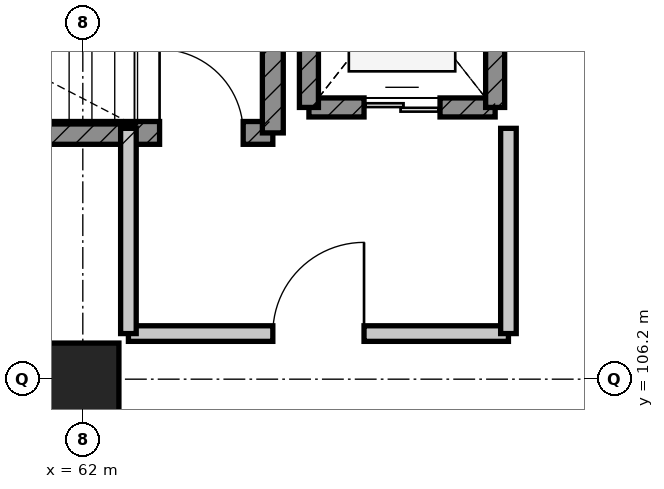
"""IFC4 building model, lengths in metres.
Left out: names, types, materials, properties, quantities, classifications, styles, units other than length and angle.
Written with IfcOpenShell. Run it as: python <this file> out.ifc"""

import sys

from ifc_helpers import new_model, si_unit, direction, frame, frame_2d, origin, origin_2d, place, context, subcontext, project, spatial, rectangle, extrude, element, fill, save


model = new_model("IFC4")
c1 = context("Model", 3, precision=1e-05, world=origin(), true_north=direction((0.0, 1.0)))
c2 = subcontext(c1, "Body", "Model", "MODEL_VIEW")
j1 = project(units=[si_unit("LENGTHUNIT", "METRE"), si_unit("PLANEANGLEUNIT", "RADIAN")], contexts=[c1])
p1 = place(None, origin())
s1 = spatial("IfcSite", under=j1, at=p1, CompositionType="ELEMENT")
p2 = place(p1, origin())
s2 = spatial("IfcBuilding", under=s1, at=p2, CompositionType="ELEMENT")
p3 = place(p2, frame((0.0, 0.0, 5.4)))
s3 = spatial("IfcBuildingStorey", under=s2, at=p3, CompositionType="ELEMENT", Elevation=5.4)
p4 = place(p3, frame((62.0, 106.2, 0.0), z_axis=(0.0, 0.0, 1.0), x_axis=(1.0, 0.0, 0.0)))
e1 = element("IfcColumn", 1, at=p4, inside=s3, PredefinedType="COLUMN", context=c2, shape_type="SweptSolid", body=[
    extrude(rectangle(XDim=0.95, YDim=0.95, at=origin_2d()), origin(), (0.0, 0.0, 1.0), 5.1),
])
p5 = place(p3, frame((56.1, 109.44, 0.0), z_axis=(0.0, 0.0, 1.0), x_axis=(1.0, 0.0, 0.0)))
e2 = element("IfcWall", 2, at=p5, inside=s3, PredefinedType="SHEAR", context=c2, shape_type="SweptSolid", body=[
    extrude(rectangle(XDim=8.4, YDim=0.3, at=frame_2d((4.2, 0.0))), origin(), (0.0, 0.0, 1.0), 4.78),
])
p6 = place(p5, frame((6.91, 0.0, 0.0)))
e3 = element("IfcOpeningElement", 3, at=p6, cuts=e2, PredefinedType="OPENING", context=c2, shape_type="SweptSolid", body=[
    extrude(rectangle(XDim=1.1, YDim=2.1, at=frame_2d((0.55, 1.05))), frame((0.0, 0.16, 0.0), z_axis=(0.0, -1.0, 0.0), x_axis=(1.0, 0.0, 0.0)), (0.0, 0.0, 1.0), 0.32),
])
p7 = place(p3, frame((64.5, 109.44, 0.0), z_axis=(0.0, 0.0, 1.0), x_axis=(0.0, 1.0, 0.0)))
e4 = element("IfcWall", 4, at=p7, inside=s3, PredefinedType="SHEAR", context=c2, shape_type="SweptSolid", body=[
    extrude(rectangle(XDim=3.56, YDim=0.275, at=frame_2d((1.78, 0.0))), origin(), (0.0, 0.0, 1.0), 4.78),
])
p8 = place(p3, frame((64.975, 109.775, 0.0), z_axis=(0.0, 0.0, 1.0), x_axis=(1.0, 0.0, 0.0)))
e5 = element("IfcWall", 5, at=p8, inside=s3, PredefinedType="SHEAR", context=c2, shape_type="SweptSolid", body=[
    extrude(rectangle(XDim=2.45, YDim=0.25, at=frame_2d((1.225, 0.0))), origin(), (0.0, 0.0, 1.0), 4.78),
])
p9 = place(p8, frame((0.725, 0.0, 0.0)))
e6 = element("IfcOpeningElement", 6, at=p9, cuts=e5, PredefinedType="OPENING", context=c2, shape_type="SweptSolid", body=[
    extrude(rectangle(XDim=1.0, YDim=2.15, at=frame_2d((0.5, 1.075))), frame((0.0, 0.135, 0.0), z_axis=(0.0, -1.0, 0.0), x_axis=(1.0, 0.0, 0.0)), (0.0, 0.0, 1.0), 0.27),
])
for number, where, z_axis, x_axis in (
    (7, (67.425, 109.775, 0.0), (0.0, 0.0, 1.0), (0.0, 1.0, 0.0)),
    (8, (64.975, 112.825, 0.0), (0.0, 0.0, 1.0), (0.0, -1.0, 0.0)),
):
    element("IfcWall", number, at=place(p3, frame(where, z_axis=z_axis, x_axis=x_axis)), inside=s3, PredefinedType="SHEAR", context=c2, shape_type="SweptSolid", body=[
        extrude(rectangle(XDim=3.05, YDim=0.25, at=frame_2d((1.525, 0.0))), origin(), (0.0, 0.0, 1.0), 4.78),
    ])
p10 = place(p3, frame((62.6, 106.8, 0.0), z_axis=(0.0, 0.0, 1.0), x_axis=(1.0, 0.0, 0.0)))
e9 = element("IfcWall", 9, at=p10, inside=s3, PredefinedType="PARTITIONING", context=c2, shape_type="SweptSolid", body=[
    extrude(rectangle(XDim=5.0, YDim=0.205, at=frame_2d((2.5, 0.0))), origin(), (0.0, 0.0, 1.0), 3.445),
])
p11 = place(p10, frame((1.9, 0.0, 0.0)))
e10 = element("IfcOpeningElement", 10, at=p11, cuts=e9, PredefinedType="OPENING", context=c2, shape_type="SweptSolid", body=[
    extrude(rectangle(XDim=1.2, YDim=2.1, at=frame_2d((0.6, 1.05))), frame((0.0, 0.113, 0.0), z_axis=(0.0, -1.0, 0.0), x_axis=(1.0, 0.0, 0.0)), (0.0, 0.0, 1.0), 0.225),
])
for number, where, z_axis, x_axis in (
    (11, (67.6, 106.8, 0.0), (0.0, 0.0, 1.0), (0.0, 1.0, 0.0)),
    (12, (62.6, 109.5, 0.0), (0.0, 0.0, 1.0), (0.0, -1.0, 0.0)),
):
    element("IfcWall", number, at=place(p3, frame(where, z_axis=z_axis, x_axis=x_axis)), inside=s3, PredefinedType="PARTITIONING", context=c2, shape_type="SweptSolid", body=[
        extrude(rectangle(XDim=2.7, YDim=0.205, at=frame_2d((1.35, 0.0))), origin(), (0.0, 0.0, 1.0), 3.445),
    ])
p12 = place(p6, origin())
e13 = element("IfcDoor", 13, at=p12, inside=s3, OperationType="SINGLE_SWING_LEFT", PredefinedType="DOOR", context=c2, shape_type="SweptSolid", body=[
    extrude(rectangle(XDim=1.1, YDim=2.1, at=frame_2d((0.55, 1.05))), frame((0.0, 0.025, 0.0), z_axis=(0.0, -1.0, 0.0), x_axis=(1.0, 0.0, 0.0)), (0.0, 0.0, 1.0), 0.05),
])
fill(e3, e13)
p13 = place(p9, origin())
e14 = element("IfcDoor", 14, at=p13, inside=s3, OperationType="DOUBLE_DOOR_SLIDING", PredefinedType="DOOR", context=c2, shape_type="SweptSolid", body=[
    extrude(rectangle(XDim=1.0, YDim=2.15, at=frame_2d((0.5, 1.075))), frame((0.0, 0.025, 0.0), z_axis=(0.0, -1.0, 0.0), x_axis=(1.0, 0.0, 0.0)), (0.0, 0.0, 1.0), 0.05),
])
fill(e6, e14)
p14 = place(p11, origin())
e15 = element("IfcDoor", 15, at=p14, inside=s3, OperationType="SINGLE_SWING_RIGHT", PredefinedType="DOOR", context=c2, shape_type="SweptSolid", body=[
    extrude(rectangle(XDim=1.2, YDim=2.1, at=frame_2d((0.6, 1.05))), frame((0.0, 0.025, 0.0), z_axis=(0.0, -1.0, 0.0), x_axis=(1.0, 0.0, 0.0)), (0.0, 0.0, 1.0), 0.05),
])
fill(e10, e15)
save(model, sys.argv[1])
